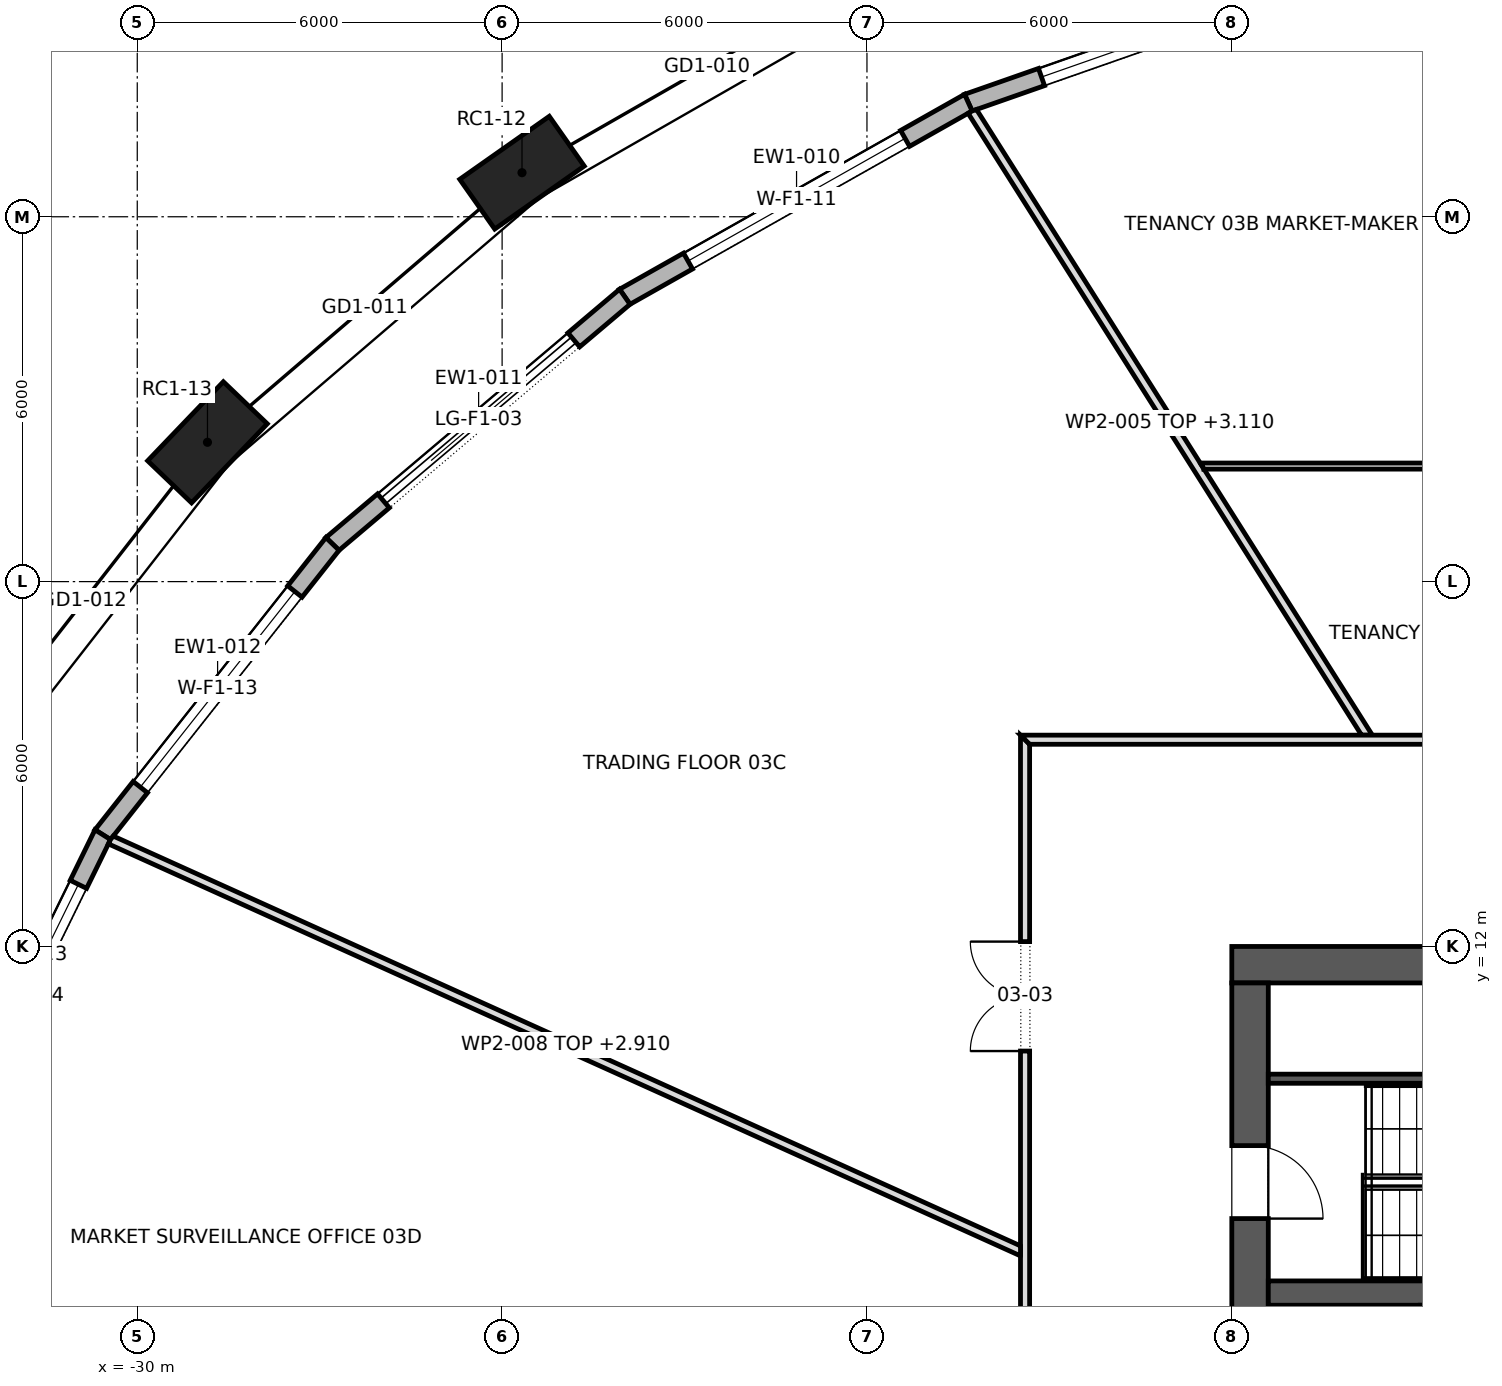
"""IFC4 building model, lengths in metres.
Left out: names, types, materials, properties, quantities, classifications, styles, units other than length and angle.
Written with IfcOpenShell. Run it as: python <this file> out.ifc"""

import sys

from ifc_helpers import new_model, si_unit, direction, frame, frame_2d, origin, origin_2d, place, context, subcontext, project, spatial, polyline, rectangle, outline, extrude, element, fill, save


model = new_model("IFC4")
c1 = context("Model", 3, precision=1e-05, world=origin(), true_north=direction((0.0, 1.0)))
c2 = subcontext(c1, "Body", "Model", "MODEL_VIEW")
j1 = project(units=[si_unit("LENGTHUNIT", "METRE"), si_unit("PLANEANGLEUNIT", "RADIAN")], contexts=[c1])
p1 = place(None, origin())
s1 = spatial("IfcSite", under=j1, at=p1, CompositionType="ELEMENT")
p2 = place(p1, origin())
s2 = spatial("IfcBuilding", under=s1, at=p2, CompositionType="ELEMENT")
p3 = place(p2, frame((0.0, 0.0, 48.7)))
s3 = spatial("IfcBuildingStorey", under=s2, at=p3, CompositionType="ELEMENT", Elevation=48.7)
for number, where, z_axis, x_axis in (
    (1, (-23.673, 24.725, 0.0), (0.0, 0.0, 1.0), (-0.818, -0.575, 0.0)),
    (2, (-28.845, 20.291, 0.0), (0.0, 0.0, 1.0), (-0.692, -0.722, 0.0)),
):
    element("IfcColumn", number, at=place(p3, frame(where, z_axis=z_axis, x_axis=x_axis)), inside=s3, PredefinedType="COLUMN", context=c2, shape_type="SweptSolid", body=[
        extrude(rectangle(XDim=1.8, YDim=1.0, at=origin_2d()), origin(), (0.0, 0.0, 1.0), 4.2),
    ])
p4 = place(p3, frame((-12.0, 11.7, 0.0), z_axis=(0.0, 0.0, 1.0), x_axis=(1.0, 0.0, 0.0)))
e3 = element("IfcWall", 3, at=p4, inside=s3, PredefinedType="SHEAR", context=c2, shape_type="SweptSolid", body=[
    extrude(rectangle(XDim=24.0, YDim=0.6, at=frame_2d((12.0, 0.0))), origin(), (0.0, 0.0, 1.0), 4.2),
])
p5 = place(p4, frame((9.975, 0.0, 0.0)))
e4 = element("IfcOpeningElement", 4, at=p5, cuts=e3, PredefinedType="OPENING", context=c2, shape_type="SweptSolid", body=[
    extrude(rectangle(XDim=0.9, YDim=2.1, at=frame_2d((0.45, 1.05))), frame((0.0, 0.312, 0.0), z_axis=(0.0, -1.0, 0.0), x_axis=(1.0, 0.0, 0.0)), (0.0, 0.0, 1.0), 0.624),
])
p6 = place(p4, frame((3.6, 0.0, 0.0)))
e5 = element("IfcOpeningElement", 5, at=p6, cuts=e3, PredefinedType="OPENING", context=c2, shape_type="SweptSolid", body=[
    extrude(rectangle(XDim=0.8, YDim=2.1, at=frame_2d((0.4, 1.05))), frame((0.0, 0.312, 0.0), z_axis=(0.0, -1.0, 0.0), x_axis=(1.0, 0.0, 0.0)), (0.0, 0.0, 1.0), 0.624),
])
p7 = place(p4, frame((6.2, 0.0, 0.0)))
e6 = element("IfcOpeningElement", 6, at=p7, cuts=e3, PredefinedType="OPENING", context=c2, shape_type="SweptSolid", body=[
    extrude(rectangle(XDim=0.8, YDim=2.1, at=frame_2d((0.4, 1.05))), frame((0.0, 0.312, 0.0), z_axis=(0.0, -1.0, 0.0), x_axis=(1.0, 0.0, 0.0)), (0.0, 0.0, 1.0), 0.624),
])
p8 = place(p4, frame((15.85, 0.0, 0.0)))
e7 = element("IfcOpeningElement", 7, at=p8, cuts=e3, PredefinedType="OPENING", context=c2, shape_type="SweptSolid", body=[
    extrude(rectangle(XDim=0.8, YDim=2.1, at=frame_2d((0.4, 1.05))), frame((0.0, 0.312, 0.0), z_axis=(0.0, -1.0, 0.0), x_axis=(1.0, 0.0, 0.0)), (0.0, 0.0, 1.0), 0.624),
])
p9 = place(p3, frame((-11.7, -11.4, 0.0), z_axis=(0.0, 0.0, 1.0), x_axis=(0.0, 1.0, 0.0)))
e8 = element("IfcWall", 8, at=p9, inside=s3, PredefinedType="SHEAR", context=c2, shape_type="SweptSolid", body=[
    extrude(rectangle(XDim=22.8, YDim=0.6, at=frame_2d((11.4, 0.0))), origin(), (0.0, 0.0, 1.0), 4.2),
])
p10 = place(p9, frame((10.2, 0.0, 0.0)))
e9 = element("IfcOpeningElement", 9, at=p10, cuts=e8, PredefinedType="OPENING", context=c2, shape_type="SweptSolid", body=[
    extrude(rectangle(XDim=2.4, YDim=2.1, at=frame_2d((1.2, 1.05))), frame((0.0, 0.312, 0.0), z_axis=(0.0, -1.0, 0.0), x_axis=(1.0, 0.0, 0.0)), (0.0, 0.0, 1.0), 0.624),
])
p11 = place(p9, frame((18.925, 0.0, 0.0)))
e10 = element("IfcOpeningElement", 10, at=p11, cuts=e8, PredefinedType="OPENING", context=c2, shape_type="SweptSolid", body=[
    extrude(rectangle(XDim=1.2, YDim=2.1, at=frame_2d((0.6, 1.05))), frame((0.0, 0.312, 0.0), z_axis=(0.0, -1.0, 0.0), x_axis=(1.0, 0.0, 0.0)), (0.0, 0.0, 1.0), 0.624),
])
p12 = place(p9, frame((2.675, 0.0, 0.0)))
e11 = element("IfcOpeningElement", 11, at=p12, cuts=e8, PredefinedType="OPENING", context=c2, shape_type="SweptSolid", body=[
    extrude(rectangle(XDim=1.2, YDim=2.1, at=frame_2d((0.6, 1.05))), frame((0.0, 0.312, 0.0), z_axis=(0.0, -1.0, 0.0), x_axis=(1.0, 0.0, 0.0)), (0.0, 0.0, 1.0), 0.624),
])
p13 = place(p3, frame((-11.4, 6.3, 0.0), z_axis=(0.0, 0.0, 1.0), x_axis=(1.0, 0.0, 0.0)))
e12 = element("IfcWall", 12, at=p13, inside=s3, PredefinedType="SHEAR", context=c2, shape_type="SweptSolid", body=[
    extrude(rectangle(XDim=22.8, YDim=0.4, at=frame_2d((11.4, 0.0))), origin(), (0.0, 0.0, 1.0), 4.2),
])
p14 = place(p13, frame((20.85, 0.0, 0.0)))
e13 = element("IfcOpeningElement", 13, at=p14, cuts=e12, PredefinedType="OPENING", context=c2, shape_type="SweptSolid", body=[
    extrude(rectangle(XDim=1.1, YDim=2.1, at=frame_2d((0.55, 1.05))), frame((0.0, 0.212, 0.0), z_axis=(0.0, -1.0, 0.0), x_axis=(1.0, 0.0, 0.0)), (0.0, 0.0, 1.0), 0.424),
])
p15 = place(p3, frame((-8.75, 3.2, 0.0), z_axis=(0.0, 0.0, 1.0), x_axis=(0.0, 1.0, 0.0)))
e14 = element("IfcWall", 14, at=p15, inside=s3, PredefinedType="SHEAR", context=c2, shape_type="SweptSolid", body=[
    extrude(rectangle(XDim=2.9, YDim=0.3, at=frame_2d((1.45, 0.0))), origin(), (0.0, 0.0, 1.0), 4.2),
])
p16 = place(p3, frame((-10.057, 28.074, 0.0), z_axis=(0.0, 0.0, 1.0), x_axis=(-0.943790794479, -0.330543395421, 0.0)))
e15 = element("IfcWall", 15, at=p16, inside=s3, PredefinedType="STANDARD", context=c2, shape_type="SweptSolid", body=[
    extrude(outline(polyline([(-0.013, -0.15), (6.663, -0.15), (6.636, 0.15), (0.013, 0.15), (-0.013, -0.15)])), origin(), (0.0, 0.0, 1.0), 3.9),
])
p17 = place(p16, frame((1.275, 0.0, 0.6)))
e16 = element("IfcOpeningElement", 16, at=p17, cuts=e15, PredefinedType="OPENING", context=c2, shape_type="SweptSolid", body=[
    extrude(rectangle(XDim=4.1, YDim=2.85, at=frame_2d((2.05, 1.425))), frame((0.0, 0.162, 0.0), z_axis=(0.0, -1.0, 0.0), x_axis=(1.0, 0.0, 0.0)), (0.0, 0.0, 1.0), 0.324),
])
p18 = place(p3, frame((-16.333, 25.876, 0.0), z_axis=(0.0, 0.0, 1.0), x_axis=(-0.870647609977, -0.491907246584, 0.0)))
e17 = element("IfcWall", 17, at=p18, inside=s3, PredefinedType="STANDARD", context=c2, shape_type="SweptSolid", body=[
    extrude(outline(polyline([(-0.013, -0.15), (6.503, -0.15), (6.475, 0.15), (0.013, 0.15), (-0.013, -0.15)])), origin(), (0.0, 0.0, 1.0), 3.9),
])
p19 = place(p18, frame((1.195, 0.0, 0.6)))
e18 = element("IfcOpeningElement", 18, at=p19, cuts=e17, PredefinedType="OPENING", context=c2, shape_type="SweptSolid", body=[
    extrude(rectangle(XDim=4.1, YDim=2.85, at=frame_2d((2.05, 1.425))), frame((0.0, 0.162, 0.0), z_axis=(0.0, -1.0, 0.0), x_axis=(1.0, 0.0, 0.0)), (0.0, 0.0, 1.0), 0.324),
])
p20 = place(p3, frame((-21.983, 22.684, 0.0), z_axis=(0.0, 0.0, 1.0), x_axis=(-0.763614259808, -0.645672720671, 0.0)))
e19 = element("IfcWall", 19, at=p20, inside=s3, PredefinedType="STANDARD", context=c2, shape_type="SweptSolid", body=[
    extrude(outline(polyline([(-0.014, -0.15), (6.31, -0.15), (6.28, 0.15), (0.014, 0.15), (-0.014, -0.15)])), origin(), (0.0, 0.0, 1.0), 3.9),
])
p21 = place(p20, frame((1.097, 0.0, 0.0)))
e20 = element("IfcOpeningElement", 20, at=p21, cuts=e19, PredefinedType="OPENING", context=c2, shape_type="SweptSolid", body=[
    extrude(rectangle(XDim=4.1, YDim=3.45, at=frame_2d((2.05, 1.725))), frame((0.0, 0.162, 0.0), z_axis=(0.0, -1.0, 0.0), x_axis=(1.0, 0.0, 0.0)), (0.0, 0.0, 1.0), 0.324),
])
p22 = place(p3, frame((-26.79, 18.62, 0.0), z_axis=(0.0, 0.0, 1.0), x_axis=(-0.619993638342, -0.78460683684, 0.0)))
e21 = element("IfcWall", 21, at=p22, inside=s3, PredefinedType="STANDARD", context=c2, shape_type="SweptSolid", body=[
    extrude(outline(polyline([(-0.015, -0.15), (6.11, -0.15), (6.078, 0.15), (0.015, 0.15), (-0.015, -0.15)])), origin(), (0.0, 0.0, 1.0), 3.9),
])
p23 = place(p22, frame((0.997, 0.0, 0.6)))
e22 = element("IfcOpeningElement", 22, at=p23, cuts=e21, PredefinedType="OPENING", context=c2, shape_type="SweptSolid", body=[
    extrude(rectangle(XDim=4.1, YDim=2.85, at=frame_2d((2.05, 1.425))), frame((0.0, 0.162, 0.0), z_axis=(0.0, -1.0, 0.0), x_axis=(1.0, 0.0, 0.0)), (0.0, 0.0, 1.0), 0.324),
])
p24 = place(p3, frame((-30.568, 13.838, 0.0), z_axis=(0.0, 0.0, 1.0), x_axis=(-0.439906146647, -0.898043752911, 0.0)))
e23 = element("IfcWall", 23, at=p24, inside=s3, PredefinedType="STANDARD", context=c2, shape_type="SweptSolid", body=[
    extrude(outline(polyline([(-0.016, -0.15), (5.936, -0.15), (5.902, 0.15), (0.016, 0.15), (-0.016, -0.15)])), origin(), (0.0, 0.0, 1.0), 3.9),
])
p25 = place(p24, frame((0.909, 0.0, 0.6)))
e24 = element("IfcOpeningElement", 24, at=p25, cuts=e23, PredefinedType="OPENING", context=c2, shape_type="SweptSolid", body=[
    extrude(rectangle(XDim=4.1, YDim=2.85, at=frame_2d((2.05, 1.425))), frame((0.0, 0.162, 0.0), z_axis=(0.0, -1.0, 0.0), x_axis=(1.0, 0.0, 0.0)), (0.0, 0.0, 1.0), 0.324),
])
p26 = place(p3, frame((-11.4, 9.825, 0.0), z_axis=(0.0, 0.0, 1.0), x_axis=(1.0, 0.0, 0.0)))
e25 = element("IfcWall", 25, at=p26, inside=s3, PredefinedType="SHEAR", context=c2, shape_type="SweptSolid", body=[
    extrude(rectangle(XDim=8.0, YDim=0.15, at=frame_2d((4.0, 0.0))), origin(), (0.0, 0.0, 1.0), 3.9),
])
p27 = place(p3, frame((-16.273, 25.742, 0.0), z_axis=(0.0, 0.0, 1.0), x_axis=(0.534654841392, -0.845070529942, 0.0)))
e26 = element("IfcWall", 26, at=p27, inside=s3, PredefinedType="PARTITIONING", context=c2, shape_type="SweptSolid", body=[
    extrude(outline(polyline([(0.0, -0.075), (1.729, -0.075), (3.458, -0.075), (5.186, -0.075), (6.915, -0.075), (8.644, -0.075), (10.373, -0.075), (12.102, -0.075), (12.196, 0.075), (12.196, 0.075), (10.471, 0.075), (8.745, 0.075), (7.019, 0.075), (7.018, 0.072), (7.013, 0.075), (5.265, 0.075), (3.517, 0.075), (1.769, 0.075), (0.021, 0.075), (0.004, 0.0), (0.0, -0.071), (0.0, -0.075)])), origin(), (0.0, 0.0, 1.0), 3.11),
])
p28 = place(p3, frame((-15.4, -15.475, 0.0), z_axis=(0.0, 0.0, 1.0), x_axis=(0.0, 1.0, 0.0)))
e27 = element("IfcWall", 27, at=p28, inside=s3, PredefinedType="PARTITIONING", context=c2, shape_type="SweptSolid", body=[
    extrude(outline(polyline([(0.15, -0.075), (2.066, -0.075), (3.981, -0.075), (5.897, -0.075), (7.812, -0.075), (9.728, -0.075), (11.644, -0.075), (13.56, -0.075), (15.475, -0.075), (17.391, -0.075), (19.306, -0.075), (21.222, -0.075), (23.138, -0.075), (25.053, -0.075), (26.969, -0.075), (28.885, -0.075), (30.8, -0.075), (30.95, 0.075), (29.016, 0.075), (27.081, 0.075), (25.147, 0.075), (23.212, 0.075), (21.278, 0.075), (19.344, 0.075), (17.409, 0.075), (15.475, 0.075), (13.541, 0.075), (11.606, 0.075), (9.672, 0.075), (7.738, 0.075), (5.803, 0.075), (3.869, 0.075), (1.935, 0.075), (0.0, 0.075), (0.15, -0.075)])), origin(), (0.0, 0.0, 1.0), 3.9),
])
p29 = place(p28, frame((25.755, 0.0, 0.0)))
e28 = element("IfcOpeningElement", 28, at=p29, cuts=e27, PredefinedType="OPENING", context=c2, shape_type="SweptSolid", body=[
    extrude(rectangle(XDim=1.8, YDim=2.1, at=frame_2d((0.9, 1.05))), frame((0.0, 0.087, 0.0), z_axis=(0.0, -1.0, 0.0), x_axis=(1.0, 0.0, 0.0)), (0.0, 0.0, 1.0), 0.174),
])
p30 = place(p28, frame((18.695, 0.0, 0.0)))
e29 = element("IfcOpeningElement", 29, at=p30, cuts=e27, PredefinedType="OPENING", context=c2, shape_type="SweptSolid", body=[
    extrude(rectangle(XDim=1.8, YDim=2.1, at=frame_2d((0.9, 1.05))), frame((0.0, 0.087, 0.0), z_axis=(0.0, -1.0, 0.0), x_axis=(1.0, 0.0, 0.0)), (0.0, 0.0, 1.0), 0.174),
])
p31 = place(p28, frame((12.135, 0.0, 0.0)))
e30 = element("IfcOpeningElement", 30, at=p31, cuts=e27, PredefinedType="OPENING", context=c2, shape_type="SweptSolid", body=[
    extrude(rectangle(XDim=1.0, YDim=2.1, at=frame_2d((0.5, 1.05))), frame((0.0, 0.087, 0.0), z_axis=(0.0, -1.0, 0.0), x_axis=(1.0, 0.0, 0.0)), (0.0, 0.0, 1.0), 0.174),
])
p32 = place(p28, frame((3.395, 0.0, 0.0)))
e31 = element("IfcOpeningElement", 31, at=p32, cuts=e27, PredefinedType="OPENING", context=c2, shape_type="SweptSolid", body=[
    extrude(rectangle(XDim=1.8, YDim=2.1, at=frame_2d((0.9, 1.05))), frame((0.0, 0.087, 0.0), z_axis=(0.0, -1.0, 0.0), x_axis=(1.0, 0.0, 0.0)), (0.0, 0.0, 1.0), 0.174),
])
p33 = place(p3, frame((-15.444, 6.98, 0.0), z_axis=(0.0, 0.0, 1.0), x_axis=(-0.911343853748, 0.411645940385, 0.0)))
e32 = element("IfcWall", 32, at=p33, inside=s3, PredefinedType="PARTITIONING", context=c2, shape_type="SweptSolid", body=[
    extrude(outline(polyline([(0.068, -0.075), (1.887, -0.075), (3.706, -0.075), (5.525, -0.075), (7.344, -0.075), (9.163, -0.075), (10.982, -0.075), (12.801, -0.075), (14.62, -0.075), (16.439, -0.075), (16.457, -0.004), (16.459, 0.064), (16.459, 0.075), (14.63, 0.075), (12.801, 0.075), (10.972, 0.075), (9.144, 0.075), (7.315, 0.075), (5.486, 0.075), (3.657, 0.075), (1.829, 0.075), (0.0, 0.075), (0.068, -0.075)])), origin(), (0.0, 0.0, 1.0), 2.91),
])
p34 = place(p3, frame((-15.475, 15.4, 0.0), z_axis=(0.0, 0.0, 1.0), x_axis=(1.0, 0.0, 0.0)))
e33 = element("IfcWall", 33, at=p34, inside=s3, PredefinedType="PARTITIONING", context=c2, shape_type="SweptSolid", body=[
    extrude(outline(polyline([(0.15, -0.075), (2.066, -0.075), (3.981, -0.075), (5.897, -0.075), (7.812, -0.075), (9.728, -0.075), (11.644, -0.075), (13.56, -0.075), (15.475, -0.075), (17.391, -0.075), (19.306, -0.075), (21.222, -0.075), (23.138, -0.075), (25.053, -0.075), (26.969, -0.075), (28.885, -0.075), (30.8, -0.075), (30.95, 0.075), (29.016, 0.075), (27.081, 0.075), (25.147, 0.075), (23.212, 0.075), (21.278, 0.075), (19.344, 0.075), (17.409, 0.075), (15.475, 0.075), (13.541, 0.075), (11.606, 0.075), (9.672, 0.075), (7.738, 0.075), (5.803, 0.075), (3.869, 0.075), (1.935, 0.075), (0.0, 0.075), (0.15, -0.075)])), origin(), (0.0, 0.0, 1.0), 3.9),
])
p35 = place(p34, frame((16.84, 0.0, 0.0)))
e34 = element("IfcOpeningElement", 34, at=p35, cuts=e33, PredefinedType="OPENING", context=c2, shape_type="SweptSolid", body=[
    extrude(rectangle(XDim=1.0, YDim=2.1, at=frame_2d((0.5, 1.05))), frame((0.0, 0.087, 0.0), z_axis=(0.0, -1.0, 0.0), x_axis=(1.0, 0.0, 0.0)), (0.0, 0.0, 1.0), 0.174),
])
p36 = place(p34, frame((9.215, 0.0, 0.0)))
e35 = element("IfcOpeningElement", 35, at=p36, cuts=e33, PredefinedType="OPENING", context=c2, shape_type="SweptSolid", body=[
    extrude(rectangle(XDim=1.0, YDim=2.1, at=frame_2d((0.5, 1.05))), frame((0.0, 0.087, 0.0), z_axis=(0.0, -1.0, 0.0), x_axis=(1.0, 0.0, 0.0)), (0.0, 0.0, 1.0), 0.174),
])
p37 = place(p34, frame((25.21, 0.0, 0.0)))
e36 = element("IfcOpeningElement", 36, at=p37, cuts=e33, PredefinedType="OPENING", context=c2, shape_type="SweptSolid", body=[
    extrude(rectangle(XDim=1.0, YDim=2.1, at=frame_2d((0.5, 1.05))), frame((0.0, 0.087, 0.0), z_axis=(0.0, -1.0, 0.0), x_axis=(1.0, 0.0, 0.0)), (0.0, 0.0, 1.0), 0.174),
])
p38 = place(p3, frame((-12.52, 19.9, 0.0), z_axis=(0.0, 0.0, 1.0), x_axis=(1.0, 0.0, 0.0)))
e37 = element("IfcWall", 37, at=p38, inside=s3, PredefinedType="PARTITIONING", context=c2, shape_type="SweptSolid", body=[
    extrude(outline(polyline([(10.134, -0.05), (10.134, -0.049), (10.122, 0.05), (8.435, 0.05), (6.748, 0.05), (5.061, 0.05), (3.374, 0.05), (1.687, 0.05), (0.0, 0.05), (0.0, 0.05), (0.063, -0.05), (1.741, -0.05), (3.42, -0.05), (5.098, -0.05), (6.777, -0.05), (8.455, -0.05), (10.134, -0.05)])), origin(), (0.0, 0.0, 1.0), 3.9),
])
p39 = place(p38, frame((4.619, 0.0, 0.0)))
e38 = element("IfcOpeningElement", 38, at=p39, cuts=e37, PredefinedType="OPENING", context=c2, shape_type="SweptSolid", body=[
    extrude(rectangle(XDim=0.9, YDim=2.1, at=frame_2d((0.45, 1.05))), frame((0.0, 0.062, 0.0), z_axis=(0.0, -1.0, 0.0), x_axis=(1.0, 0.0, 0.0)), (0.0, 0.0, 1.0), 0.124),
])
p40 = place(p17, origin())
e39 = element("IfcWindow", 39, at=p40, inside=s3, PartitioningType="TRIPLE_PANEL_VERTICAL", PredefinedType="WINDOW", context=c2, shape_type="SweptSolid", body=[
    extrude(rectangle(XDim=4.1, YDim=2.85, at=frame_2d((2.05, 1.425))), frame((0.0, 0.03, 0.0), z_axis=(0.0, -1.0, 0.0), x_axis=(1.0, 0.0, 0.0)), (0.0, 0.0, 1.0), 0.06),
])
fill(e16, e39)
p41 = place(p19, origin())
e40 = element("IfcWindow", 40, at=p41, inside=s3, PartitioningType="TRIPLE_PANEL_VERTICAL", PredefinedType="WINDOW", context=c2, shape_type="SweptSolid", body=[
    extrude(rectangle(XDim=4.1, YDim=2.85, at=frame_2d((2.05, 1.425))), frame((0.0, 0.03, 0.0), z_axis=(0.0, -1.0, 0.0), x_axis=(1.0, 0.0, 0.0)), (0.0, 0.0, 1.0), 0.06),
])
fill(e18, e40)
p42 = place(p21, origin())
e41 = element("IfcDoor", 41, at=p42, inside=s3, OperationType="DOUBLE_DOOR_SLIDING", PredefinedType="DOOR", context=c2, shape_type="SweptSolid", body=[
    extrude(rectangle(XDim=4.1, YDim=3.45, at=frame_2d((2.05, 1.725))), frame((0.0, 0.025, 0.0), z_axis=(0.0, -1.0, 0.0), x_axis=(1.0, 0.0, 0.0)), (0.0, 0.0, 1.0), 0.05),
])
fill(e20, e41)
p43 = place(p23, origin())
e42 = element("IfcWindow", 42, at=p43, inside=s3, PartitioningType="TRIPLE_PANEL_VERTICAL", PredefinedType="WINDOW", context=c2, shape_type="SweptSolid", body=[
    extrude(rectangle(XDim=4.1, YDim=2.85, at=frame_2d((2.05, 1.425))), frame((0.0, 0.03, 0.0), z_axis=(0.0, -1.0, 0.0), x_axis=(1.0, 0.0, 0.0)), (0.0, 0.0, 1.0), 0.06),
])
fill(e22, e42)
p44 = place(p25, origin())
e43 = element("IfcWindow", 43, at=p44, inside=s3, PartitioningType="TRIPLE_PANEL_VERTICAL", PredefinedType="WINDOW", context=c2, shape_type="SweptSolid", body=[
    extrude(rectangle(XDim=4.1, YDim=2.85, at=frame_2d((2.05, 1.425))), frame((0.0, 0.03, 0.0), z_axis=(0.0, -1.0, 0.0), x_axis=(1.0, 0.0, 0.0)), (0.0, 0.0, 1.0), 0.06),
])
fill(e24, e43)
p45 = place(p11, frame((1.2, 0.0, 0.0), z_axis=(0.0, 0.0, 1.0), x_axis=(-1.0, 0.0, 0.0)))
e44 = element("IfcDoor", 44, at=p45, inside=s3, OperationType="SINGLE_SWING_LEFT", PredefinedType="DOOR", context=c2, shape_type="SweptSolid", body=[
    extrude(rectangle(XDim=1.2, YDim=2.1, at=frame_2d((0.6, 1.05))), frame((0.0, 0.025, 0.0), z_axis=(0.0, -1.0, 0.0), x_axis=(1.0, 0.0, 0.0)), (0.0, 0.0, 1.0), 0.05),
])
fill(e10, e44)
p46 = place(p29, origin())
e45 = element("IfcDoor", 45, at=p46, inside=s3, OperationType="DOUBLE_DOOR_SINGLE_SWING", PredefinedType="DOOR", context=c2, shape_type="SweptSolid", body=[
    extrude(rectangle(XDim=1.8, YDim=2.1, at=frame_2d((0.9, 1.05))), frame((0.0, 0.025, 0.0), z_axis=(0.0, -1.0, 0.0), x_axis=(1.0, 0.0, 0.0)), (0.0, 0.0, 1.0), 0.05),
])
fill(e28, e45)
save(model, sys.argv[1])
